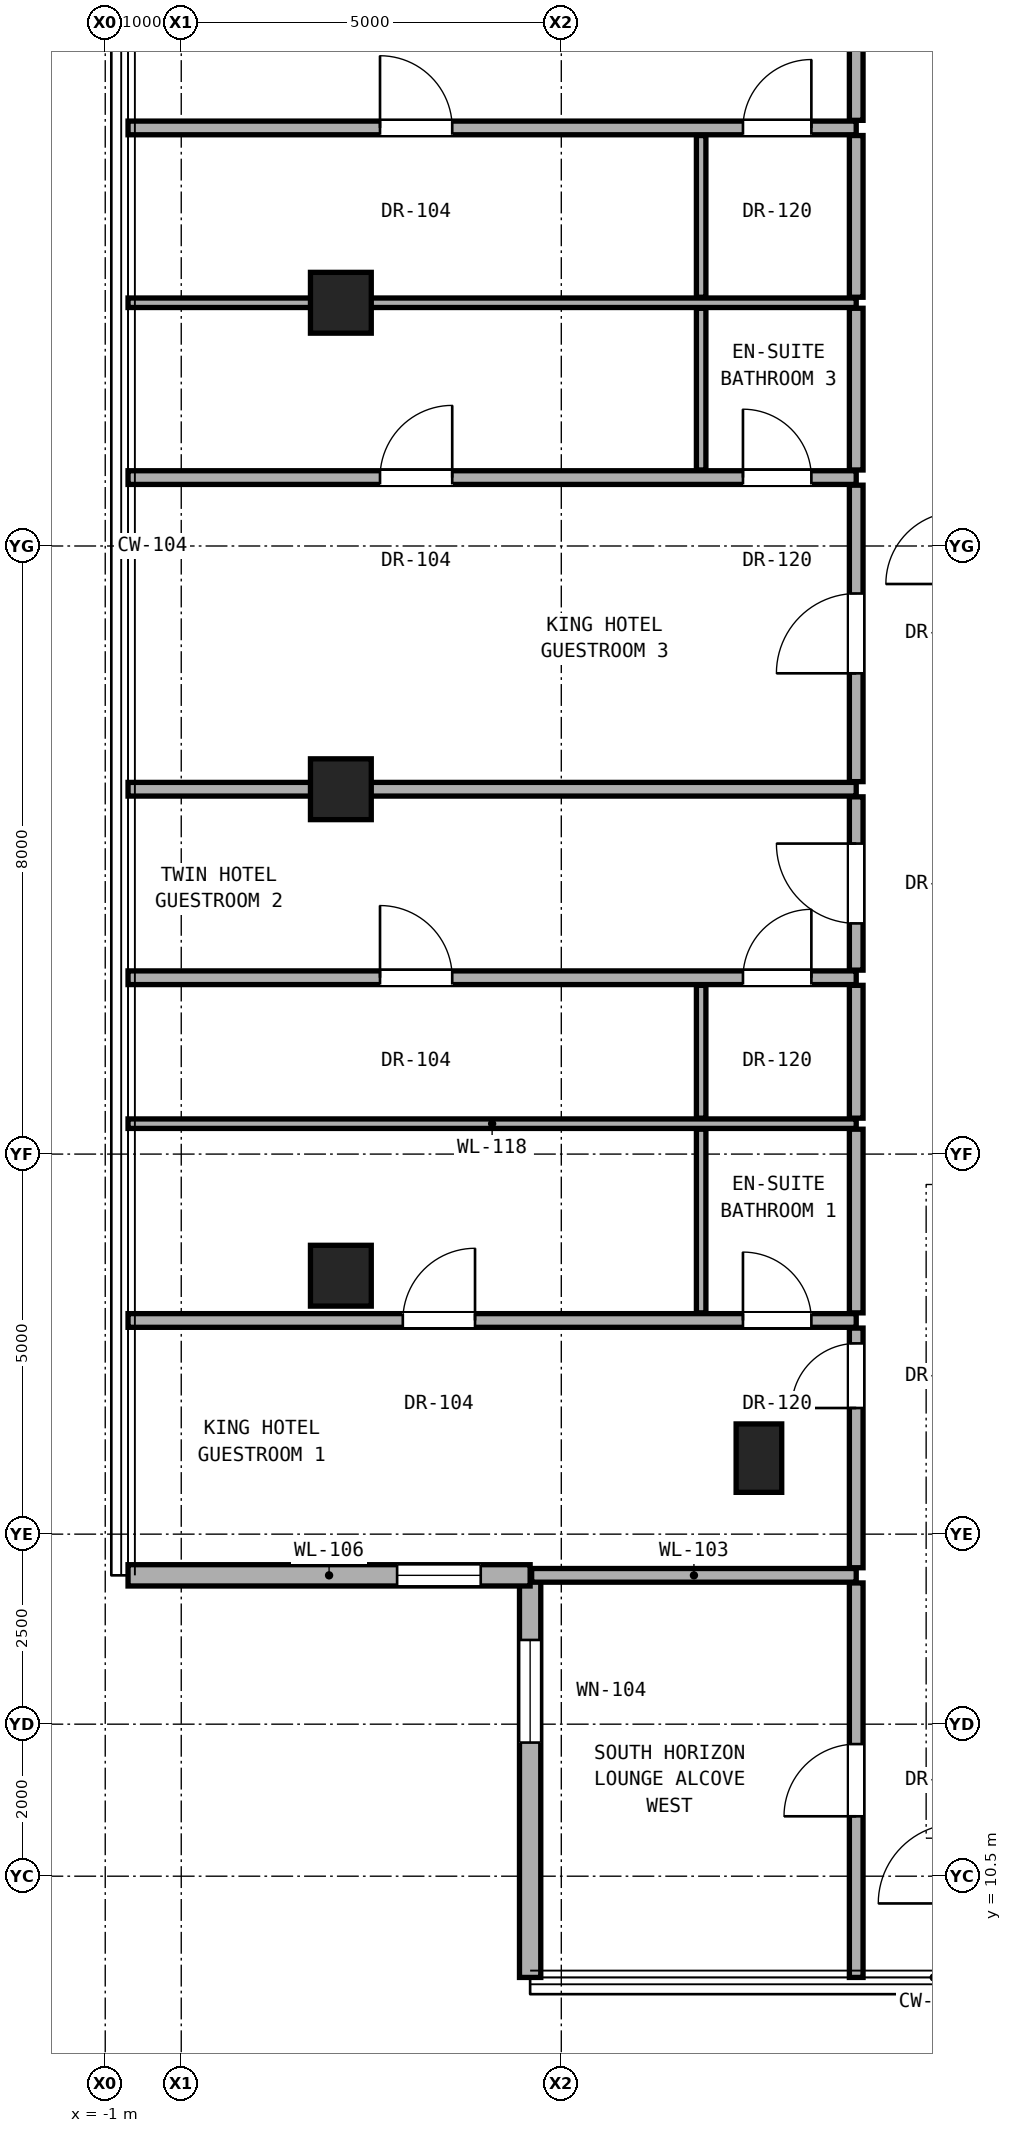
"""IFC4 building model, lengths in metres.
Left out: names, types, materials, properties, quantities, classifications, styles, units other than length and angle.
Written with IfcOpenShell. Run it as: python <this file> out.ifc"""

import sys

from ifc_helpers import new_model, si_unit, direction, frame, frame_2d, origin, origin_2d, place, context, subcontext, project, spatial, rectangle, hollow_rectangle, extrude, element, fill, save


model = new_model("IFC4")
c1 = context("Model", 3, precision=1e-05, world=origin(), true_north=direction((0.0, 1.0)))
c2 = subcontext(c1, "Body", "Model", "MODEL_VIEW")
j1 = project(units=[si_unit("LENGTHUNIT", "METRE"), si_unit("PLANEANGLEUNIT", "RADIAN")], contexts=[c1])
p1 = place(None, origin())
s1 = spatial("IfcSite", under=j1, at=p1, CompositionType="ELEMENT")
p2 = place(p1, origin())
s2 = spatial("IfcBuilding", under=s1, at=p2, CompositionType="ELEMENT")
p3 = place(p2, frame((0.0, 0.0, 232.6)))
s3 = spatial("IfcBuildingStorey", under=s2, at=p3, CompositionType="ELEMENT", Elevation=232.6)
for number, where, z_axis, x_axis in (
    (1, (2.1, 18.4, 0.0), (0.0, 0.0, 1.0), (1.0, 0.0, 0.0)),
    (2, (2.1, 24.8, 0.0), (0.0, 0.0, 1.0), (1.0, 0.0, 0.0)),
    (3, (2.1, 31.2, 0.0), (0.0, 0.0, 1.0), (1.0, 0.0, 0.0)),
):
    element("IfcColumn", number, at=place(p3, frame(where, z_axis=z_axis, x_axis=x_axis)), inside=s3, PredefinedType="COLUMN", context=c2, shape_type="SweptSolid", body=[
        extrude(hollow_rectangle(XDim=0.8, YDim=0.8, WallThickness=0.045, at=origin_2d()), origin(), (0.0, 0.0, 1.0), 3.3),
    ])
p4 = place(p3, frame((7.6, 16.0, 0.0), z_axis=(0.0, 0.0, 1.0), x_axis=(1.0, 0.0, 0.0)))
e4 = element("IfcColumn", 4, at=p4, inside=s3, PredefinedType="PILASTER", context=c2, shape_type="SweptSolid", body=[
    extrude(rectangle(XDim=0.6, YDim=0.9, at=origin_2d()), origin(), (0.0, 0.0, 1.0), 3.3),
])
p5 = place(p3, frame((4.59, 14.458, 0.0), z_axis=(0.0, 0.0, 1.0), x_axis=(0.0, -1.0, 0.0)))
e5 = element("IfcWall", 5, at=p5, inside=s3, PredefinedType="SOLIDWALL", context=c2, shape_type="SweptSolid", body=[
    extrude(rectangle(XDim=5.29, YDim=0.28, at=frame_2d((2.645, 0.0))), origin(), (0.0, 0.0, 1.0), 3.08),
])
p6 = place(p5, frame((0.85, 0.0, 0.73)))
e6 = element("IfcOpeningElement", 6, at=p6, cuts=e5, PredefinedType="OPENING", context=c2, shape_type="SweptSolid", body=[
    extrude(rectangle(XDim=1.35, YDim=2.2, at=frame_2d((0.675, 1.1))), frame((0.0, 0.15, 0.0), z_axis=(0.0, -1.0, 0.0), x_axis=(1.0, 0.0, 0.0)), (0.0, 0.0, 1.0), 0.3),
])
p7 = place(p3, frame((-0.7, 14.458, 0.0), z_axis=(0.0, 0.0, 1.0), x_axis=(1.0, 0.0, 0.0)))
e7 = element("IfcWall", 7, at=p7, inside=s3, PredefinedType="SOLIDWALL", context=c2, shape_type="SweptSolid", body=[
    extrude(rectangle(XDim=5.29, YDim=0.28, at=frame_2d((2.645, 0.0))), origin(), (0.0, 0.0, 1.0), 3.08),
])
p8 = place(p7, frame((3.54, 0.0, 0.85)))
e8 = element("IfcOpeningElement", 8, at=p8, cuts=e7, PredefinedType="OPENING", context=c2, shape_type="SweptSolid", body=[
    extrude(rectangle(XDim=1.1, YDim=2.0, at=frame_2d((0.55, 1.0))), frame((0.0, 0.15, 0.0), z_axis=(0.0, -1.0, 0.0), x_axis=(1.0, 0.0, 0.0)), (0.0, 0.0, 1.0), 0.3),
])
p9 = place(p3, frame((4.61, 14.458, 0.0), z_axis=(0.0, 0.0, 1.0), x_axis=(1.0, 0.0, 0.0)))
e9 = element("IfcWall", 9, at=p9, inside=s3, PredefinedType="PARTITIONING", context=c2, shape_type="SweptSolid", body=[
    extrude(rectangle(XDim=4.27, YDim=0.18, at=frame_2d((2.135, 0.0))), origin(), (0.0, 0.0, 1.0), 3.1),
])
p10 = place(p3, frame((-0.7, 17.811, 0.0), z_axis=(0.0, 0.0, 1.0), x_axis=(1.0, 0.0, 0.0)))
e10 = element("IfcWall", 10, at=p10, inside=s3, PredefinedType="PARTITIONING", context=c2, shape_type="SweptSolid", body=[
    extrude(rectangle(XDim=9.58, YDim=0.18, at=frame_2d((4.79, 0.0))), origin(), (0.0, 0.0, 1.0), 2.543),
])
p11 = place(p10, frame((3.615, 0.0, 0.0)))
e11 = element("IfcOpeningElement", 11, at=p11, cuts=e10, PredefinedType="OPENING", context=c2, shape_type="SweptSolid", body=[
    extrude(rectangle(XDim=0.95, YDim=2.15, at=frame_2d((0.475, 1.075))), frame((0.0, 0.1, 0.0), z_axis=(0.0, -1.0, 0.0), x_axis=(1.0, 0.0, 0.0)), (0.0, 0.0, 1.0), 0.2),
])
p12 = place(p10, frame((8.09, 0.0, 0.0)))
e12 = element("IfcOpeningElement", 12, at=p12, cuts=e10, PredefinedType="OPENING", context=c2, shape_type="SweptSolid", body=[
    extrude(rectangle(XDim=0.9, YDim=2.1, at=frame_2d((0.45, 1.05))), frame((0.0, 0.1, 0.0), z_axis=(0.0, -1.0, 0.0), x_axis=(1.0, 0.0, 0.0)), (0.0, 0.0, 1.0), 0.2),
])
p13 = place(p3, frame((-0.7, 20.4, 0.0), z_axis=(0.0, 0.0, 1.0), x_axis=(1.0, 0.0, 0.0)))
e13 = element("IfcWall", 13, at=p13, inside=s3, PredefinedType="PARTITIONING", context=c2, shape_type="SweptSolid", body=[
    extrude(rectangle(XDim=9.58, YDim=0.125, at=frame_2d((4.79, 0.0))), origin(), (0.0, 0.0, 1.0), 2.319),
])
p14 = place(p3, frame((-0.7, 22.32, 0.0), z_axis=(0.0, 0.0, 1.0), x_axis=(1.0, 0.0, 0.0)))
e14 = element("IfcWall", 14, at=p14, inside=s3, PredefinedType="PARTITIONING", context=c2, shape_type="SweptSolid", body=[
    extrude(rectangle(XDim=9.58, YDim=0.18, at=frame_2d((4.79, 0.0))), origin(), (0.0, 0.0, 1.0), 2.319),
])
p15 = place(p14, frame((3.315, 0.0, 0.0)))
e15 = element("IfcOpeningElement", 15, at=p15, cuts=e14, PredefinedType="OPENING", context=c2, shape_type="SweptSolid", body=[
    extrude(rectangle(XDim=0.95, YDim=2.15, at=frame_2d((0.475, 1.075))), frame((0.0, 0.1, 0.0), z_axis=(0.0, -1.0, 0.0), x_axis=(1.0, 0.0, 0.0)), (0.0, 0.0, 1.0), 0.2),
])
p16 = place(p14, frame((8.09, 0.0, 0.0)))
e16 = element("IfcOpeningElement", 16, at=p16, cuts=e14, PredefinedType="OPENING", context=c2, shape_type="SweptSolid", body=[
    extrude(rectangle(XDim=0.9, YDim=2.1, at=frame_2d((0.45, 1.05))), frame((0.0, 0.1, 0.0), z_axis=(0.0, -1.0, 0.0), x_axis=(1.0, 0.0, 0.0)), (0.0, 0.0, 1.0), 0.2),
])
p17 = place(p3, frame((-0.7, 24.8, 0.0), z_axis=(0.0, 0.0, 1.0), x_axis=(1.0, 0.0, 0.0)))
e17 = element("IfcWall", 17, at=p17, inside=s3, PredefinedType="PARTITIONING", context=c2, shape_type="SweptSolid", body=[
    extrude(rectangle(XDim=9.58, YDim=0.18, at=frame_2d((4.79, 0.0))), origin(), (0.0, 0.0, 1.0), 2.319),
])
p18 = place(p3, frame((-0.7, 28.9, 0.0), z_axis=(0.0, 0.0, 1.0), x_axis=(1.0, 0.0, 0.0)))
e18 = element("IfcWall", 18, at=p18, inside=s3, PredefinedType="PARTITIONING", context=c2, shape_type="SweptSolid", body=[
    extrude(rectangle(XDim=9.58, YDim=0.18, at=frame_2d((4.79, 0.0))), origin(), (0.0, 0.0, 1.0), 2.319),
])
p19 = place(p18, frame((3.315, 0.0, 0.0)))
e19 = element("IfcOpeningElement", 19, at=p19, cuts=e18, PredefinedType="OPENING", context=c2, shape_type="SweptSolid", body=[
    extrude(rectangle(XDim=0.95, YDim=2.15, at=frame_2d((0.475, 1.075))), frame((0.0, 0.1, 0.0), z_axis=(0.0, -1.0, 0.0), x_axis=(1.0, 0.0, 0.0)), (0.0, 0.0, 1.0), 0.2),
])
p20 = place(p18, frame((8.09, 0.0, 0.0)))
e20 = element("IfcOpeningElement", 20, at=p20, cuts=e18, PredefinedType="OPENING", context=c2, shape_type="SweptSolid", body=[
    extrude(rectangle(XDim=0.9, YDim=2.1, at=frame_2d((0.45, 1.05))), frame((0.0, 0.1, 0.0), z_axis=(0.0, -1.0, 0.0), x_axis=(1.0, 0.0, 0.0)), (0.0, 0.0, 1.0), 0.2),
])
p21 = place(p3, frame((-0.7, 31.2, 0.0), z_axis=(0.0, 0.0, 1.0), x_axis=(1.0, 0.0, 0.0)))
e21 = element("IfcWall", 21, at=p21, inside=s3, PredefinedType="PARTITIONING", context=c2, shape_type="SweptSolid", body=[
    extrude(rectangle(XDim=9.58, YDim=0.125, at=frame_2d((4.79, 0.0))), origin(), (0.0, 0.0, 1.0), 2.319),
])
p22 = place(p3, frame((-0.7, 33.5, 0.0), z_axis=(0.0, 0.0, 1.0), x_axis=(1.0, 0.0, 0.0)))
e22 = element("IfcWall", 22, at=p22, inside=s3, PredefinedType="PARTITIONING", context=c2, shape_type="SweptSolid", body=[
    extrude(rectangle(XDim=9.58, YDim=0.18, at=frame_2d((4.79, 0.0))), origin(), (0.0, 0.0, 1.0), 2.319),
])
p23 = place(p22, frame((3.315, 0.0, 0.0)))
e23 = element("IfcOpeningElement", 23, at=p23, cuts=e22, PredefinedType="OPENING", context=c2, shape_type="SweptSolid", body=[
    extrude(rectangle(XDim=0.95, YDim=2.15, at=frame_2d((0.475, 1.075))), frame((0.0, 0.1, 0.0), z_axis=(0.0, -1.0, 0.0), x_axis=(1.0, 0.0, 0.0)), (0.0, 0.0, 1.0), 0.2),
])
p24 = place(p22, frame((8.09, 0.0, 0.0)))
e24 = element("IfcOpeningElement", 24, at=p24, cuts=e22, PredefinedType="OPENING", context=c2, shape_type="SweptSolid", body=[
    extrude(rectangle(XDim=0.9, YDim=2.1, at=frame_2d((0.45, 1.05))), frame((0.0, 0.1, 0.0), z_axis=(0.0, -1.0, 0.0), x_axis=(1.0, 0.0, 0.0)), (0.0, 0.0, 1.0), 0.2),
])
p25 = place(p3, frame((6.84, 17.911, 0.0), z_axis=(0.0, 0.0, 1.0), x_axis=(0.0, 1.0, 0.0)))
e25 = element("IfcWall", 25, at=p25, inside=s3, PredefinedType="PARTITIONING", context=c2, shape_type="SweptSolid", body=[
    extrude(rectangle(XDim=2.417, YDim=0.125, at=frame_2d((1.208, 0.0))), origin(), (0.0, 0.0, 1.0), 2.492),
])
p26 = place(p3, frame((6.84, 20.472, 0.0), z_axis=(0.0, 0.0, 1.0), x_axis=(0.0, 1.0, 0.0)))
e26 = element("IfcWall", 26, at=p26, inside=s3, PredefinedType="PARTITIONING", context=c2, shape_type="SweptSolid", body=[
    extrude(rectangle(XDim=1.748, YDim=0.125, at=frame_2d((0.874, 0.0))), origin(), (0.0, 0.0, 1.0), 3.1),
])
for number, where, z_axis, x_axis in (
    (27, (6.84, 29.0, 0.0), (0.0, 0.0, 1.0), (0.0, 1.0, 0.0)),
    (28, (6.84, 31.272, 0.0), (0.0, 0.0, 1.0), (0.0, 1.0, 0.0)),
):
    element("IfcWall", number, at=place(p3, frame(where, z_axis=z_axis, x_axis=x_axis)), inside=s3, PredefinedType="PARTITIONING", context=c2, shape_type="SweptSolid", body=[
        extrude(rectangle(XDim=2.127, YDim=0.125, at=frame_2d((1.064, 0.0))), origin(), (0.0, 0.0, 1.0), 2.396),
    ])
p27 = place(p3, frame((8.88, 9.168, 0.0), z_axis=(0.0, 0.0, 1.0), x_axis=(0.0, 1.0, 0.0)))
e29 = element("IfcWall", 29, at=p27, inside=s3, PredefinedType="PARTITIONING", context=c2, shape_type="SweptSolid", body=[
    extrude(rectangle(XDim=5.19, YDim=0.18, at=frame_2d((2.595, 0.0))), origin(), (0.0, 0.0, 1.0), 3.1),
])
p28 = place(p27, frame((2.12, 0.0, 0.0)))
e30 = element("IfcOpeningElement", 30, at=p28, cuts=e29, PredefinedType="OPENING", context=c2, shape_type="SweptSolid", body=[
    extrude(rectangle(XDim=0.95, YDim=2.15, at=frame_2d((0.475, 1.075))), frame((0.0, 0.1, 0.0), z_axis=(0.0, -1.0, 0.0), x_axis=(1.0, 0.0, 0.0)), (0.0, 0.0, 1.0), 0.2),
])
p29 = place(p3, frame((8.88, 14.558, 0.0), z_axis=(0.0, 0.0, 1.0), x_axis=(0.0, 1.0, 0.0)))
e31 = element("IfcWall", 31, at=p29, inside=s3, PredefinedType="PARTITIONING", context=c2, shape_type="SweptSolid", body=[
    extrude(rectangle(XDim=3.153, YDim=0.18, at=frame_2d((1.576, 0.0))), origin(), (0.0, 0.0, 1.0), 2.543),
])
p30 = place(p29, frame((2.102, 0.0, 0.0)))
e32 = element("IfcOpeningElement", 32, at=p30, cuts=e31, PredefinedType="OPENING", context=c2, shape_type="SweptSolid", body=[
    extrude(rectangle(XDim=0.85, YDim=2.01, at=frame_2d((0.425, 1.005))), frame((0.0, 0.1, 0.0), z_axis=(0.0, -1.0, 0.0), x_axis=(1.0, 0.0, 0.0)), (0.0, 0.0, 1.0), 0.2),
])
p31 = place(p3, frame((8.88, 17.911, 0.0), z_axis=(0.0, 0.0, 1.0), x_axis=(0.0, 1.0, 0.0)))
e33 = element("IfcWall", 33, at=p31, inside=s3, PredefinedType="PARTITIONING", context=c2, shape_type="SweptSolid", body=[
    extrude(rectangle(XDim=2.417, YDim=0.18, at=frame_2d((1.208, 0.0))), origin(), (0.0, 0.0, 1.0), 2.492),
])
p32 = place(p3, frame((8.88, 20.472, 0.0), z_axis=(0.0, 0.0, 1.0), x_axis=(0.0, 1.0, 0.0)))
e34 = element("IfcWall", 34, at=p32, inside=s3, PredefinedType="PARTITIONING", context=c2, shape_type="SweptSolid", body=[
    extrude(rectangle(XDim=1.748, YDim=0.18, at=frame_2d((0.874, 0.0))), origin(), (0.0, 0.0, 1.0), 3.1),
])
p33 = place(p3, frame((8.88, 22.42, 0.0), z_axis=(0.0, 0.0, 1.0), x_axis=(0.0, 1.0, 0.0)))
e35 = element("IfcWall", 35, at=p33, inside=s3, PredefinedType="PARTITIONING", context=c2, shape_type="SweptSolid", body=[
    extrude(rectangle(XDim=2.28, YDim=0.18, at=frame_2d((1.14, 0.0))), origin(), (0.0, 0.0, 1.0), 2.396),
])
p34 = place(p33, frame((0.615, 0.0, 0.0)))
e36 = element("IfcOpeningElement", 36, at=p34, cuts=e35, PredefinedType="OPENING", context=c2, shape_type="SweptSolid", body=[
    extrude(rectangle(XDim=1.05, YDim=2.2, at=frame_2d((0.525, 1.1))), frame((0.0, 0.1, 0.0), z_axis=(0.0, -1.0, 0.0), x_axis=(1.0, 0.0, 0.0)), (0.0, 0.0, 1.0), 0.2),
])
p35 = place(p3, frame((8.88, 24.9, 0.0), z_axis=(0.0, 0.0, 1.0), x_axis=(0.0, 1.0, 0.0)))
e37 = element("IfcWall", 37, at=p35, inside=s3, PredefinedType="PARTITIONING", context=c2, shape_type="SweptSolid", body=[
    extrude(rectangle(XDim=3.9, YDim=0.18, at=frame_2d((1.95, 0.0))), origin(), (0.0, 0.0, 1.0), 2.396),
])
p36 = place(p35, frame((1.425, 0.0, 0.0)))
e38 = element("IfcOpeningElement", 38, at=p36, cuts=e37, PredefinedType="OPENING", context=c2, shape_type="SweptSolid", body=[
    extrude(rectangle(XDim=1.05, YDim=2.2, at=frame_2d((0.525, 1.1))), frame((0.0, 0.1, 0.0), z_axis=(0.0, -1.0, 0.0), x_axis=(1.0, 0.0, 0.0)), (0.0, 0.0, 1.0), 0.2),
])
for number, where, z_axis, x_axis in (
    (39, (8.88, 29.0, 0.0), (0.0, 0.0, 1.0), (0.0, 1.0, 0.0)),
    (40, (8.88, 31.272, 0.0), (0.0, 0.0, 1.0), (0.0, 1.0, 0.0)),
):
    element("IfcWall", number, at=place(p3, frame(where, z_axis=z_axis, x_axis=x_axis)), inside=s3, PredefinedType="PARTITIONING", context=c2, shape_type="SweptSolid", body=[
        extrude(rectangle(XDim=2.127, YDim=0.18, at=frame_2d((1.064, 0.0))), origin(), (0.0, 0.0, 1.0), 2.396),
    ])
p37 = place(p3, frame((8.88, 33.6, 0.0), z_axis=(0.0, 0.0, 1.0), x_axis=(0.0, 1.0, 0.0)))
e41 = element("IfcWall", 41, at=p37, inside=s3, PredefinedType="PARTITIONING", context=c2, shape_type="SweptSolid", body=[
    extrude(rectangle(XDim=7.842, YDim=0.18, at=frame_2d((3.921, 0.0))), origin(), (0.0, 0.0, 1.0), 2.492),
])
p38 = place(p37, frame((3.396, 0.0, 0.0)))
e42 = element("IfcOpeningElement", 42, at=p38, cuts=e41, PredefinedType="OPENING", context=c2, shape_type="SweptSolid", body=[
    extrude(rectangle(XDim=1.05, YDim=2.2, at=frame_2d((0.525, 1.1))), frame((0.0, 0.1, 0.0), z_axis=(0.0, -1.0, 0.0), x_axis=(1.0, 0.0, 0.0)), (0.0, 0.0, 1.0), 0.2),
])
p39 = place(p6, origin())
e43 = element("IfcWindow", 43, at=p39, inside=s3, PartitioningType="SINGLE_PANEL", PredefinedType="WINDOW", context=c2, shape_type="SweptSolid", body=[
    extrude(rectangle(XDim=1.35, YDim=2.2, at=frame_2d((0.675, 1.1))), frame((0.0, 0.03, 0.0), z_axis=(0.0, -1.0, 0.0), x_axis=(1.0, 0.0, 0.0)), (0.0, 0.0, 1.0), 0.06),
])
fill(e6, e43)
p40 = place(p8, origin())
e44 = element("IfcWindow", 44, at=p40, inside=s3, PartitioningType="SINGLE_PANEL", PredefinedType="WINDOW", context=c2, shape_type="SweptSolid", body=[
    extrude(rectangle(XDim=1.1, YDim=2.0, at=frame_2d((0.55, 1.0))), frame((0.0, 0.03, 0.0), z_axis=(0.0, -1.0, 0.0), x_axis=(1.0, 0.0, 0.0)), (0.0, 0.0, 1.0), 0.06),
])
fill(e8, e44)
p41 = place(p30, origin())
e45 = element("IfcDoor", 45, at=p41, inside=s3, OperationType="SINGLE_SWING_LEFT", PredefinedType="DOOR", context=c2, shape_type="SweptSolid", body=[
    extrude(rectangle(XDim=0.85, YDim=2.01, at=frame_2d((0.425, 1.005))), frame((0.0, 0.025, 0.0), z_axis=(0.0, -1.0, 0.0), x_axis=(1.0, 0.0, 0.0)), (0.0, 0.0, 1.0), 0.05),
])
fill(e32, e45)
p42 = place(p11, origin())
e46 = element("IfcDoor", 46, at=p42, inside=s3, OperationType="SINGLE_SWING_RIGHT", PredefinedType="DOOR", context=c2, shape_type="SweptSolid", body=[
    extrude(rectangle(XDim=0.95, YDim=2.15, at=frame_2d((0.475, 1.075))), frame((0.0, 0.025, 0.0), z_axis=(0.0, -1.0, 0.0), x_axis=(1.0, 0.0, 0.0)), (0.0, 0.0, 1.0), 0.05),
])
fill(e11, e46)
p43 = place(p12, origin())
e47 = element("IfcDoor", 47, at=p43, inside=s3, OperationType="SINGLE_SWING_LEFT", PredefinedType="DOOR", context=c2, shape_type="SweptSolid", body=[
    extrude(rectangle(XDim=0.9, YDim=2.1, at=frame_2d((0.45, 1.05))), frame((0.0, 0.025, 0.0), z_axis=(0.0, -1.0, 0.0), x_axis=(1.0, 0.0, 0.0)), (0.0, 0.0, 1.0), 0.05),
])
fill(e12, e47)
p44 = place(p34, origin())
e48 = element("IfcDoor", 48, at=p44, inside=s3, OperationType="SINGLE_SWING_RIGHT", PredefinedType="DOOR", context=c2, shape_type="SweptSolid", body=[
    extrude(rectangle(XDim=1.05, YDim=2.2, at=frame_2d((0.525, 1.1))), frame((0.0, 0.025, 0.0), z_axis=(0.0, -1.0, 0.0), x_axis=(1.0, 0.0, 0.0)), (0.0, 0.0, 1.0), 0.05),
])
fill(e36, e48)
p45 = place(p15, origin())
e49 = element("IfcDoor", 49, at=p45, inside=s3, OperationType="SINGLE_SWING_LEFT", PredefinedType="DOOR", context=c2, shape_type="SweptSolid", body=[
    extrude(rectangle(XDim=0.95, YDim=2.15, at=frame_2d((0.475, 1.075))), frame((0.0, 0.025, 0.0), z_axis=(0.0, -1.0, 0.0), x_axis=(1.0, 0.0, 0.0)), (0.0, 0.0, 1.0), 0.05),
])
fill(e15, e49)
p46 = place(p16, origin())
e50 = element("IfcDoor", 50, at=p46, inside=s3, OperationType="SINGLE_SWING_RIGHT", PredefinedType="DOOR", context=c2, shape_type="SweptSolid", body=[
    extrude(rectangle(XDim=0.9, YDim=2.1, at=frame_2d((0.45, 1.05))), frame((0.0, 0.025, 0.0), z_axis=(0.0, -1.0, 0.0), x_axis=(1.0, 0.0, 0.0)), (0.0, 0.0, 1.0), 0.05),
])
fill(e16, e50)
p47 = place(p36, origin())
e51 = element("IfcDoor", 51, at=p47, inside=s3, OperationType="SINGLE_SWING_LEFT", PredefinedType="DOOR", context=c2, shape_type="SweptSolid", body=[
    extrude(rectangle(XDim=1.05, YDim=2.2, at=frame_2d((0.525, 1.1))), frame((0.0, 0.025, 0.0), z_axis=(0.0, -1.0, 0.0), x_axis=(1.0, 0.0, 0.0)), (0.0, 0.0, 1.0), 0.05),
])
fill(e38, e51)
p48 = place(p19, origin())
e52 = element("IfcDoor", 52, at=p48, inside=s3, OperationType="SINGLE_SWING_RIGHT", PredefinedType="DOOR", context=c2, shape_type="SweptSolid", body=[
    extrude(rectangle(XDim=0.95, YDim=2.15, at=frame_2d((0.475, 1.075))), frame((0.0, 0.025, 0.0), z_axis=(0.0, -1.0, 0.0), x_axis=(1.0, 0.0, 0.0)), (0.0, 0.0, 1.0), 0.05),
])
fill(e19, e52)
p49 = place(p20, origin())
e53 = element("IfcDoor", 53, at=p49, inside=s3, OperationType="SINGLE_SWING_LEFT", PredefinedType="DOOR", context=c2, shape_type="SweptSolid", body=[
    extrude(rectangle(XDim=0.9, YDim=2.1, at=frame_2d((0.45, 1.05))), frame((0.0, 0.025, 0.0), z_axis=(0.0, -1.0, 0.0), x_axis=(1.0, 0.0, 0.0)), (0.0, 0.0, 1.0), 0.05),
])
fill(e20, e53)
p50 = place(p23, origin())
e54 = element("IfcDoor", 54, at=p50, inside=s3, OperationType="SINGLE_SWING_LEFT", PredefinedType="DOOR", context=c2, shape_type="SweptSolid", body=[
    extrude(rectangle(XDim=0.95, YDim=2.15, at=frame_2d((0.475, 1.075))), frame((0.0, 0.025, 0.0), z_axis=(0.0, -1.0, 0.0), x_axis=(1.0, 0.0, 0.0)), (0.0, 0.0, 1.0), 0.05),
])
fill(e23, e54)
p51 = place(p24, origin())
e55 = element("IfcDoor", 55, at=p51, inside=s3, OperationType="SINGLE_SWING_RIGHT", PredefinedType="DOOR", context=c2, shape_type="SweptSolid", body=[
    extrude(rectangle(XDim=0.9, YDim=2.1, at=frame_2d((0.45, 1.05))), frame((0.0, 0.025, 0.0), z_axis=(0.0, -1.0, 0.0), x_axis=(1.0, 0.0, 0.0)), (0.0, 0.0, 1.0), 0.05),
])
fill(e24, e55)
p52 = place(p28, origin())
e56 = element("IfcDoor", 56, at=p52, inside=s3, OperationType="SINGLE_SWING_LEFT", PredefinedType="DOOR", context=c2, shape_type="SweptSolid", body=[
    extrude(rectangle(XDim=0.95, YDim=2.15, at=frame_2d((0.475, 1.075))), frame((0.0, 0.025, 0.0), z_axis=(0.0, -1.0, 0.0), x_axis=(1.0, 0.0, 0.0)), (0.0, 0.0, 1.0), 0.05),
])
fill(e30, e56)
save(model, sys.argv[1])
